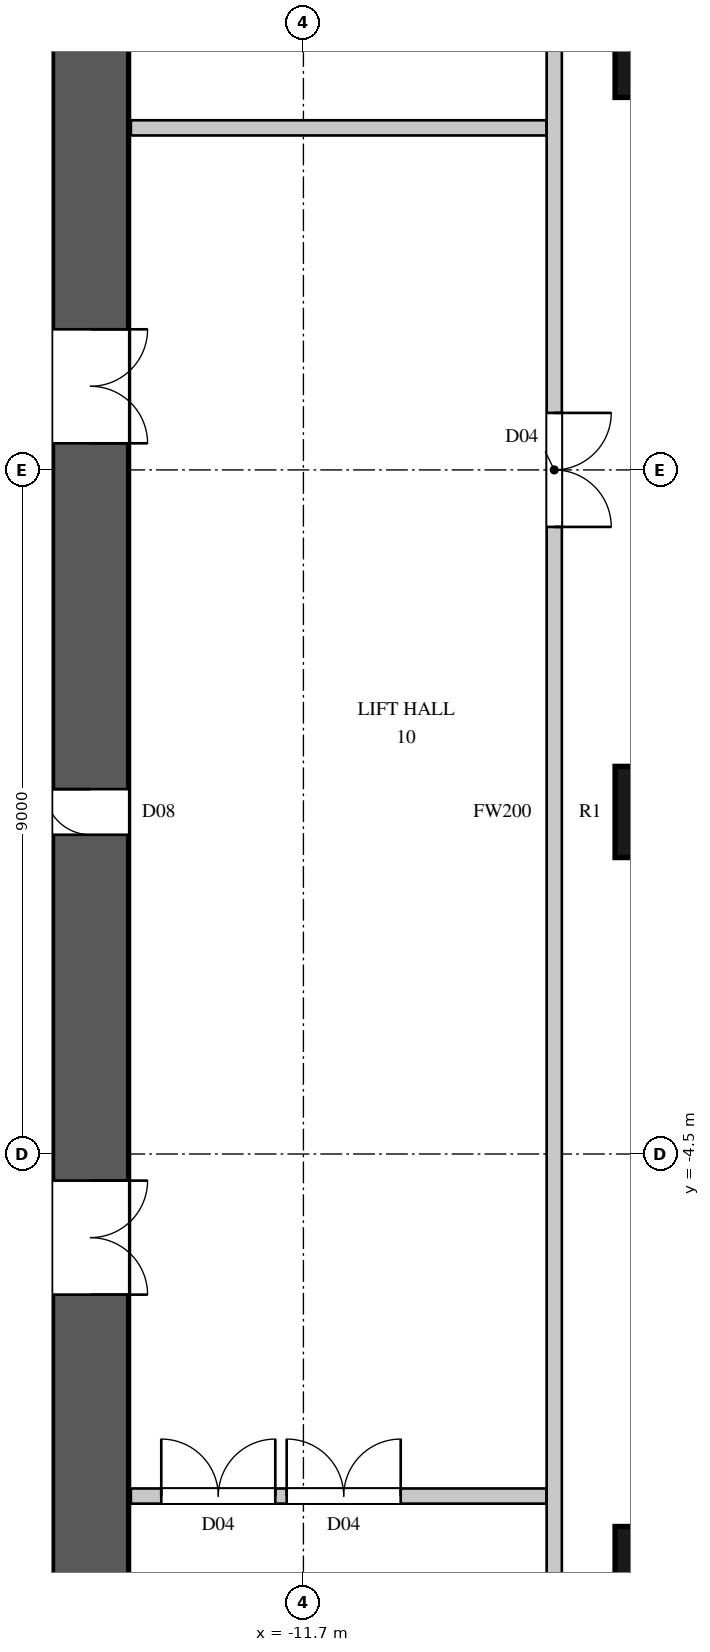
"""IFC4 building model, lengths in metres.
Left out: names, types, materials, properties, quantities, classifications, styles, units other than length and angle.
Written with IfcOpenShell. Run it as: python <this file> out.ifc"""

import sys

from ifc_helpers import new_model, si_unit, direction, frame, frame_2d, origin, origin_2d, place, context, subcontext, project, spatial, rectangle, circle, extrude, element, fill, save


model = new_model("IFC4")
c1 = context("Model", 3, precision=1e-05, world=origin(), true_north=direction((0.0, 1.0)))
c2 = subcontext(c1, "Body", "Model", "MODEL_VIEW")
j1 = project(units=[si_unit("LENGTHUNIT", "METRE"), si_unit("PLANEANGLEUNIT", "RADIAN")], contexts=[c1])
p1 = place(None, origin())
s1 = spatial("IfcSite", under=j1, at=p1, CompositionType="ELEMENT")
p2 = place(p1, origin())
s2 = spatial("IfcBuilding", under=s1, at=p2, CompositionType="ELEMENT")
p3 = place(p2, frame((0.0, 0.0, 66.3)))
s3 = spatial("IfcBuildingStorey", under=s2, at=p3, CompositionType="ELEMENT", Elevation=66.3)
for number, where, z_axis, x_axis in (
    (1, (-7.0, -10.0, 0.0), (0.0, 0.0, 1.0), (1.0, 0.0, 0.0)),
    (2, (-7.0, 0.0, 0.0), (0.0, 0.0, 1.0), (1.0, 0.0, 0.0)),
    (3, (-7.0, 10.0, 0.0), (0.0, 0.0, 1.0), (1.0, 0.0, 0.0)),
):
    element("IfcColumn", number, at=place(p3, frame(where, z_axis=z_axis, x_axis=x_axis)), inside=s3, PredefinedType="COLUMN", context=c2, shape_type="SweptSolid", body=[
        extrude(circle(Radius=0.6, at=origin_2d()), origin(), (0.0, 0.0, 1.0), 3.6),
    ])
p4 = place(p3, frame((-14.5, -14.8, 0.0), z_axis=(0.0, 0.0, 1.0), x_axis=(0.0, 1.0, 0.0)))
e4 = element("IfcWall", 4, at=p4, inside=s3, PredefinedType="SHEAR", context=c2, shape_type="SweptSolid", body=[
    extrude(rectangle(XDim=29.6, YDim=1.0, at=frame_2d((14.8, 0.0))), origin(), (0.0, 0.0, 1.0), 3.6),
])
p5 = place(p4, frame((8.45, 0.0, 0.0)))
e5 = element("IfcOpeningElement", 5, at=p5, cuts=e4, PredefinedType="OPENING", context=c2, shape_type="SweptSolid", body=[
    extrude(rectangle(XDim=1.5, YDim=2.4, at=frame_2d((0.75, 1.2))), frame((0.0, 0.51, 0.0), z_axis=(0.0, -1.0, 0.0), x_axis=(1.0, 0.0, 0.0)), (0.0, 0.0, 1.0), 1.02),
])
p6 = place(p4, frame((19.65, 0.0, 0.0)))
e6 = element("IfcOpeningElement", 6, at=p6, cuts=e4, PredefinedType="OPENING", context=c2, shape_type="SweptSolid", body=[
    extrude(rectangle(XDim=1.5, YDim=2.4, at=frame_2d((0.75, 1.2))), frame((0.0, 0.51, 0.0), z_axis=(0.0, -1.0, 0.0), x_axis=(1.0, 0.0, 0.0)), (0.0, 0.0, 1.0), 1.02),
])
p7 = place(p4, frame((14.5, 0.0, 0.0)))
e7 = element("IfcOpeningElement", 7, at=p7, cuts=e4, PredefinedType="OPENING", context=c2, shape_type="SweptSolid", body=[
    extrude(rectangle(XDim=0.6, YDim=2.0, at=frame_2d((0.3, 1.0))), frame((0.0, 0.51, 0.0), z_axis=(0.0, -1.0, 0.0), x_axis=(1.0, 0.0, 0.0)), (0.0, 0.0, 1.0), 1.02),
])
p8 = place(p3, frame((-13.97, -9.0, 0.0), z_axis=(0.0, 0.0, 1.0), x_axis=(1.0, 0.0, 0.0)))
e8 = element("IfcWall", 8, at=p8, inside=s3, PredefinedType="PARTITIONING", context=c2, shape_type="SweptSolid", body=[
    extrude(rectangle(XDim=5.47, YDim=0.2, at=frame_2d((2.735, 0.0))), origin(), (0.0, 0.0, 1.0), 3.3),
])
p9 = place(p8, frame((0.4, 0.0, 0.0)))
e9 = element("IfcOpeningElement", 9, at=p9, cuts=e8, PredefinedType="OPENING", context=c2, shape_type="SweptSolid", body=[
    extrude(rectangle(XDim=1.5, YDim=2.2, at=frame_2d((0.75, 1.1))), frame((0.0, 0.11, 0.0), z_axis=(0.0, -1.0, 0.0), x_axis=(1.0, 0.0, 0.0)), (0.0, 0.0, 1.0), 0.22),
])
p10 = place(p8, frame((2.05, 0.0, 0.0)))
e10 = element("IfcOpeningElement", 10, at=p10, cuts=e8, PredefinedType="OPENING", context=c2, shape_type="SweptSolid", body=[
    extrude(rectangle(XDim=1.5, YDim=2.2, at=frame_2d((0.75, 1.1))), frame((0.0, 0.11, 0.0), z_axis=(0.0, -1.0, 0.0), x_axis=(1.0, 0.0, 0.0)), (0.0, 0.0, 1.0), 0.22),
])
p11 = place(p3, frame((-13.97, 9.0, 0.0), z_axis=(0.0, 0.0, 1.0), x_axis=(1.0, 0.0, 0.0)))
e11 = element("IfcWall", 11, at=p11, inside=s3, PredefinedType="PARTITIONING", context=c2, shape_type="SweptSolid", body=[
    extrude(rectangle(XDim=5.47, YDim=0.2, at=frame_2d((2.735, 0.0))), origin(), (0.0, 0.0, 1.0), 3.3),
])
p12 = place(p3, frame((-8.4, -17.4, 0.0), z_axis=(0.0, 0.0, 1.0), x_axis=(0.0, 1.0, 0.0)))
e12 = element("IfcWall", 12, at=p12, inside=s3, PredefinedType="PARTITIONING", context=c2, shape_type="SweptSolid", body=[
    extrude(rectangle(XDim=34.8, YDim=0.2, at=frame_2d((17.4, 0.0))), origin(), (0.0, 0.0, 1.0), 3.3),
])
p13 = place(p12, frame((21.15, 0.0, 0.0)))
e13 = element("IfcOpeningElement", 13, at=p13, cuts=e12, PredefinedType="OPENING", context=c2, shape_type="SweptSolid", body=[
    extrude(rectangle(XDim=1.5, YDim=2.2, at=frame_2d((0.75, 1.1))), frame((0.0, 0.11, 0.0), z_axis=(0.0, -1.0, 0.0), x_axis=(1.0, 0.0, 0.0)), (0.0, 0.0, 1.0), 0.22),
])
p14 = place(p12, frame((33.75, 0.0, 0.0)))
e14 = element("IfcOpeningElement", 14, at=p14, cuts=e12, PredefinedType="OPENING", context=c2, shape_type="SweptSolid", body=[
    extrude(rectangle(XDim=0.9, YDim=2.2, at=frame_2d((0.45, 1.1))), frame((0.0, 0.11, 0.0), z_axis=(0.0, -1.0, 0.0), x_axis=(1.0, 0.0, 0.0)), (0.0, 0.0, 1.0), 0.22),
])
p15 = place(p12, frame((0.15, 0.0, 0.0)))
e15 = element("IfcOpeningElement", 15, at=p15, cuts=e12, PredefinedType="OPENING", context=c2, shape_type="SweptSolid", body=[
    extrude(rectangle(XDim=0.95, YDim=2.2, at=frame_2d((0.475, 1.1))), frame((0.0, 0.11, 0.0), z_axis=(0.0, -1.0, 0.0), x_axis=(1.0, 0.0, 0.0)), (0.0, 0.0, 1.0), 0.22),
])
p16 = place(p13, origin())
e16 = element("IfcDoor", 16, at=p16, inside=s3, OperationType="DOUBLE_DOOR_SINGLE_SWING", PredefinedType="DOOR", context=c2, shape_type="SweptSolid", body=[
    extrude(rectangle(XDim=1.5, YDim=2.2, at=frame_2d((0.75, 1.1))), frame((0.0, 0.025, 0.0), z_axis=(0.0, -1.0, 0.0), x_axis=(1.0, 0.0, 0.0)), (0.0, 0.0, 1.0), 0.05),
])
fill(e13, e16)
p17 = place(p9, origin())
e17 = element("IfcDoor", 17, at=p17, inside=s3, OperationType="DOUBLE_DOOR_SINGLE_SWING", PredefinedType="DOOR", context=c2, shape_type="SweptSolid", body=[
    extrude(rectangle(XDim=1.5, YDim=2.2, at=frame_2d((0.75, 1.1))), frame((0.0, 0.025, 0.0), z_axis=(0.0, -1.0, 0.0), x_axis=(1.0, 0.0, 0.0)), (0.0, 0.0, 1.0), 0.05),
])
fill(e9, e17)
p18 = place(p10, origin())
e18 = element("IfcDoor", 18, at=p18, inside=s3, OperationType="DOUBLE_DOOR_SINGLE_SWING", PredefinedType="DOOR", context=c2, shape_type="SweptSolid", body=[
    extrude(rectangle(XDim=1.5, YDim=2.2, at=frame_2d((0.75, 1.1))), frame((0.0, 0.025, 0.0), z_axis=(0.0, -1.0, 0.0), x_axis=(1.0, 0.0, 0.0)), (0.0, 0.0, 1.0), 0.05),
])
fill(e10, e18)
p19 = place(p5, origin())
e19 = element("IfcDoor", 19, at=p19, inside=s3, OperationType="DOUBLE_DOOR_SINGLE_SWING", PredefinedType="DOOR", context=c2, shape_type="SweptSolid", body=[
    extrude(rectangle(XDim=1.5, YDim=2.4, at=frame_2d((0.75, 1.2))), frame((0.0, -0.445, 0.0), z_axis=(0.0, -1.0, 0.0), x_axis=(1.0, 0.0, 0.0)), (0.0, 0.0, 1.0), 0.05),
])
fill(e5, e19)
p20 = place(p6, origin())
e20 = element("IfcDoor", 20, at=p20, inside=s3, OperationType="DOUBLE_DOOR_SINGLE_SWING", PredefinedType="DOOR", context=c2, shape_type="SweptSolid", body=[
    extrude(rectangle(XDim=1.5, YDim=2.4, at=frame_2d((0.75, 1.2))), frame((0.0, -0.445, 0.0), z_axis=(0.0, -1.0, 0.0), x_axis=(1.0, 0.0, 0.0)), (0.0, 0.0, 1.0), 0.05),
])
fill(e6, e20)
p21 = place(p7, origin())
e21 = element("IfcDoor", 21, at=p21, inside=s3, OperationType="SINGLE_SWING_RIGHT", PredefinedType="DOOR", context=c2, shape_type="SweptSolid", body=[
    extrude(rectangle(XDim=0.6, YDim=2.0, at=frame_2d((0.3, 1.0))), frame((0.0, 0.495, 0.0), z_axis=(0.0, -1.0, 0.0), x_axis=(1.0, 0.0, 0.0)), (0.0, 0.0, 1.0), 0.05),
])
fill(e7, e21)
save(model, sys.argv[1])
